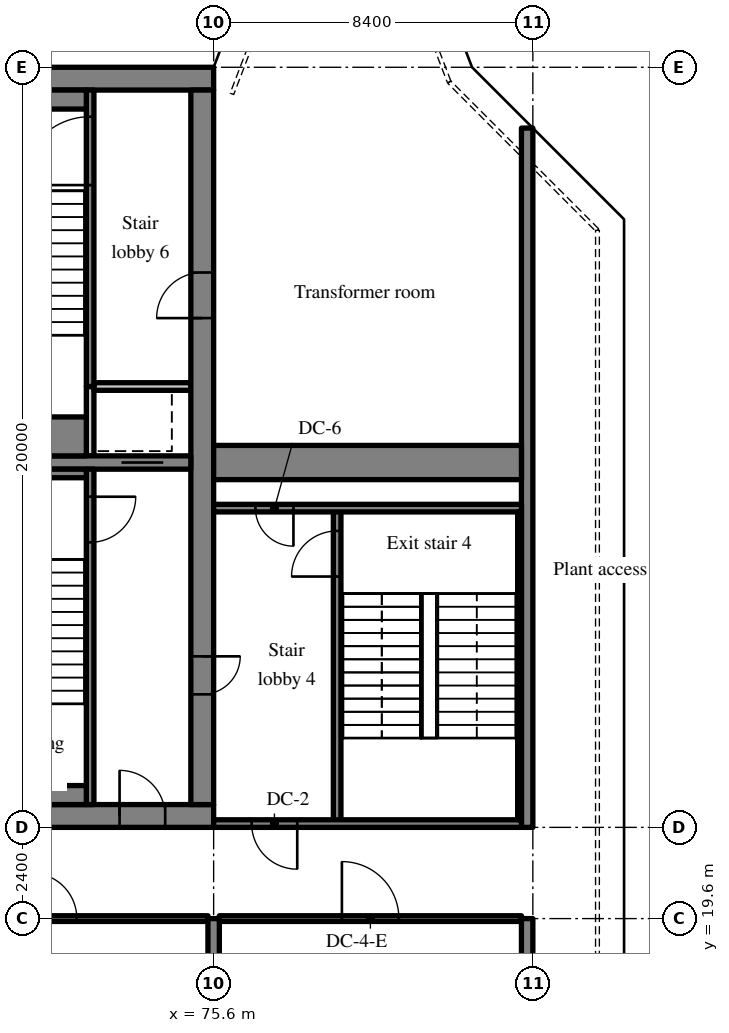
"""IFC4 building model, lengths in metres.
Left out: names, types, materials, properties, quantities, classifications, styles, units other than length and angle.
Written with IfcOpenShell. Run it as: python <this file> out.ifc"""

import sys

from ifc_helpers import new_model, si_unit, direction, frame, frame_2d, origin, place, context, subcontext, project, spatial, rectangle, extrude, source, transform, mapped, element, fill, save


model = new_model("IFC4")
c1 = context("Model", 3, precision=1e-05, world=origin(), true_north=direction((0.0, 1.0)))
c2 = subcontext(c1, "Body", "Model", "MODEL_VIEW")
j1 = project(units=[si_unit("LENGTHUNIT", "METRE"), si_unit("PLANEANGLEUNIT", "RADIAN")], contexts=[c1])
p1 = place(None, origin())
s1 = spatial("IfcSite", under=j1, at=p1, CompositionType="ELEMENT")
p2 = place(p1, origin())
s2 = spatial("IfcBuilding", under=s1, at=p2, CompositionType="ELEMENT")
p3 = place(p2, frame((0.0, 0.0, 264.7)))
s3 = spatial("IfcBuildingStorey", under=s2, at=p3, CompositionType="ELEMENT", Elevation=264.7)
m1 = source(origin(), c2, "Body", "SweptSolid", [
    extrude(rectangle(XDim=50.4, YDim=0.6, at=frame_2d((25.2, 0.0))), origin(), (0.0, 0.0, 1.0), 5.12),
])
p4 = place(p3, frame((25.2, 22.3, 0.0), z_axis=(0.0, 0.0, 1.0), x_axis=(1.0, 0.0, 0.0)))
e1 = element("IfcWall", 1, at=p4, inside=s3, PredefinedType="SHEAR", context=c2, shape_type="MappedRepresentation", body=[
    mapped(m1, transform((0.0, 0.0, 0.0), scale=1.0)),
])
m2 = source(origin(), c2, "Body", "SweptSolid", [
    extrude(rectangle(XDim=1.2, YDim=2.1, at=frame_2d((0.6, 1.05))), frame((0.0, 0.31, 0.0), z_axis=(0.0, -1.0, 0.0), x_axis=(1.0, 0.0, 0.0)), (0.0, 0.0, 1.0), 0.62),
])
p5 = place(p4, frame((22.262, 0.0, 0.0)))
e2 = element("IfcOpeningElement", 2, at=p5, cuts=e1, PredefinedType="OPENING", context=c2, shape_type="MappedRepresentation", body=[
    mapped(m2, transform((0.0, 0.0, 0.0), scale=1.0)),
])
m3 = source(origin(), c2, "Body", "SweptSolid", [
    extrude(rectangle(XDim=0.9, YDim=2.1, at=frame_2d((0.45, 1.05))), frame((0.0, 0.31, 0.0), z_axis=(0.0, -1.0, 0.0), x_axis=(1.0, 0.0, 0.0)), (0.0, 0.0, 1.0), 0.62),
])
p6 = place(p4, frame((17.25, 0.0, 0.0)))
e3 = element("IfcOpeningElement", 3, at=p6, cuts=e1, PredefinedType="OPENING", context=c2, shape_type="MappedRepresentation", body=[
    mapped(m3, transform((0.0, 0.0, 0.0), scale=1.0)),
])
p7 = place(p4, frame((9.656, 0.0, 0.0)))
e4 = element("IfcOpeningElement", 4, at=p7, cuts=e1, PredefinedType="OPENING", context=c2, shape_type="MappedRepresentation", body=[
    mapped(m3, transform((0.0, 0.0, 0.0), scale=1.0)),
])
p8 = place(p4, frame((12.719, 0.0, 0.0)))
e5 = element("IfcOpeningElement", 5, at=p8, cuts=e1, PredefinedType="OPENING", context=c2, shape_type="MappedRepresentation", body=[
    mapped(m3, transform((0.0, 0.0, 0.0), scale=1.0)),
])
m4 = source(origin(), c2, "Body", "SweptSolid", [
    extrude(rectangle(XDim=1.8, YDim=2.1, at=frame_2d((0.9, 1.05))), frame((0.0, 0.31, 0.0), z_axis=(0.0, -1.0, 0.0), x_axis=(1.0, 0.0, 0.0)), (0.0, 0.0, 1.0), 0.62),
])
p9 = place(p4, frame((32.7, 0.0, 0.0)))
e6 = element("IfcOpeningElement", 6, at=p9, cuts=e1, PredefinedType="OPENING", context=c2, shape_type="MappedRepresentation", body=[
    mapped(m4, transform((0.0, 0.0, 0.0), scale=1.0)),
])
p10 = place(p4, frame((6.488, 0.0, 0.0)))
e7 = element("IfcOpeningElement", 7, at=p10, cuts=e1, PredefinedType="OPENING", context=c2, shape_type="MappedRepresentation", body=[
    mapped(m2, transform((0.0, 0.0, 0.0), scale=1.0)),
])
p11 = place(p4, frame((47.925, 0.0, 0.0)))
e8 = element("IfcOpeningElement", 8, at=p11, cuts=e1, PredefinedType="OPENING", context=c2, shape_type="MappedRepresentation", body=[
    mapped(m2, transform((0.0, 0.0, 0.0), scale=1.0)),
])
p12 = place(p3, frame((25.2, 41.7, 0.0), z_axis=(0.0, 0.0, 1.0), x_axis=(1.0, 0.0, 0.0)))
e9 = element("IfcWall", 9, at=p12, inside=s3, PredefinedType="SHEAR", context=c2, shape_type="MappedRepresentation", body=[
    mapped(m1, transform((0.0, 0.0, 0.0), scale=1.0)),
])
m5 = source(origin(), c2, "Body", "SweptSolid", [
    extrude(rectangle(XDim=18.8, YDim=0.6, at=frame_2d((9.4, 0.0))), origin(), (0.0, 0.0, 1.0), 5.12),
])
p13 = place(p3, frame((75.3, 22.6, 0.0), z_axis=(0.0, 0.0, 1.0), x_axis=(0.0, 1.0, 0.0)))
e10 = element("IfcWall", 10, at=p13, inside=s3, PredefinedType="SHEAR", context=c2, shape_type="MappedRepresentation", body=[
    mapped(m5, transform((0.0, 0.0, 0.0), scale=1.0)),
])
m6 = source(origin(), c2, "Body", "SweptSolid", [
    extrude(rectangle(XDim=1.0, YDim=2.1, at=frame_2d((0.5, 1.05))), frame((0.0, 0.31, 0.0), z_axis=(0.0, -1.0, 0.0), x_axis=(1.0, 0.0, 0.0)), (0.0, 0.0, 1.0), 0.62),
])
p14 = place(p13, frame((2.9, 0.0, 0.0)))
e11 = element("IfcOpeningElement", 11, at=p14, cuts=e10, PredefinedType="OPENING", context=c2, shape_type="MappedRepresentation", body=[
    mapped(m6, transform((0.0, 0.0, 0.0), scale=1.0)),
])
p15 = place(p13, frame((12.8, 0.0, 0.0)))
e12 = element("IfcOpeningElement", 12, at=p15, cuts=e10, PredefinedType="OPENING", context=c2, shape_type="MappedRepresentation", body=[
    mapped(m2, transform((0.0, 0.0, 0.0), scale=1.0)),
])
m7 = source(origin(), c2, "Body", "SweptSolid", [
    extrude(rectangle(XDim=7.625, YDim=0.35, at=frame_2d((3.812, 0.0))), origin(), (0.0, 0.0, 1.0), 5.12),
])
p16 = place(p3, frame((67.375, 31.6, 0.0), z_axis=(0.0, 0.0, 1.0), x_axis=(1.0, 0.0, 0.0)))
e13 = element("IfcWall", 13, at=p16, inside=s3, PredefinedType="SHEAR", context=c2, shape_type="MappedRepresentation", body=[
    mapped(m7, transform((0.0, 0.0, 0.0), scale=1.0)),
])
m8 = source(origin(), c2, "Body", "SweptSolid", [
    extrude(rectangle(XDim=1.1, YDim=2.1, at=frame_2d((0.55, 1.05))), frame((0.0, 0.185, 0.0), z_axis=(0.0, -1.0, 0.0), x_axis=(1.0, 0.0, 0.0)), (0.0, 0.0, 1.0), 0.37),
])
p17 = place(p16, frame((5.8, 0.0, 0.0)))
e14 = element("IfcOpeningElement", 14, at=p17, cuts=e13, PredefinedType="OPENING", context=c2, shape_type="MappedRepresentation", body=[
    mapped(m8, transform((0.0, 0.0, 0.0), scale=1.0)),
])
m9 = source(origin(), c2, "Body", "SweptSolid", [
    extrude(rectangle(XDim=14.1, YDim=0.3, at=frame_2d((7.05, 0.0))), origin(), (0.0, 0.0, 1.0), 5.12),
])
p18 = place(p3, frame((75.6, 5.5, 0.0), z_axis=(0.0, 0.0, 1.0), x_axis=(0.0, 1.0, 0.0)))
e15 = element("IfcWall", 15, at=p18, inside=s3, PredefinedType="SHEAR", context=c2, shape_type="MappedRepresentation", body=[
    mapped(m9, transform((0.0, 0.0, 0.0), scale=1.0)),
])
m10 = source(origin(), c2, "Body", "SweptSolid", [
    extrude(rectangle(XDim=12.5, YDim=0.3, at=frame_2d((6.25, 0.0))), origin(), (0.0, 0.0, 1.0), 5.12),
])
p19 = place(p3, frame((83.85, 7.1, 0.0), z_axis=(0.0, 0.0, 1.0), x_axis=(0.0, 1.0, 0.0)))
e16 = element("IfcWall", 16, at=p19, inside=s3, PredefinedType="SHEAR", context=c2, shape_type="MappedRepresentation", body=[
    mapped(m10, transform((0.0, 0.0, 0.0), scale=1.0)),
])
m11 = source(origin(), c2, "Body", "SweptSolid", [
    extrude(rectangle(XDim=18.4, YDim=0.3, at=frame_2d((9.2, 0.0))), origin(), (0.0, 0.0, 1.0), 5.12),
])
p20 = place(p3, frame((83.85, 22.0, 0.0), z_axis=(0.0, 0.0, 1.0), x_axis=(0.0, 1.0, 0.0)))
e17 = element("IfcWall", 17, at=p20, inside=s3, PredefinedType="SHEAR", context=c2, shape_type="MappedRepresentation", body=[
    mapped(m11, transform((0.0, 0.0, 0.0), scale=1.0)),
])
m12 = source(origin(), c2, "Body", "SweptSolid", [
    extrude(rectangle(XDim=8.1, YDim=0.9, at=frame_2d((4.05, 0.0))), origin(), (0.0, 0.0, 1.0), 5.12),
])
p21 = place(p3, frame((75.6, 31.6, 0.0), z_axis=(0.0, 0.0, 1.0), x_axis=(1.0, 0.0, 0.0)))
e18 = element("IfcWall", 18, at=p21, inside=s3, PredefinedType="SHEAR", context=c2, shape_type="MappedRepresentation", body=[
    mapped(m12, transform((0.0, 0.0, 0.0), scale=1.0)),
])
m13 = source(origin(), c2, "Body", "SweptSolid", [
    extrude(rectangle(XDim=8.825, YDim=0.2, at=frame_2d((4.413, 0.0))), origin(), (0.0, 0.0, 1.0), 5.12),
])
p22 = place(p3, frame((72.35, 22.6, 0.0), z_axis=(0.0, 0.0, 1.0), x_axis=(0.0, 1.0, 0.0)))
e19 = element("IfcWall", 19, at=p22, inside=s3, PredefinedType="SOLIDWALL", context=c2, shape_type="MappedRepresentation", body=[
    mapped(m13, transform((0.0, 0.0, 0.0), scale=1.0)),
])
m14 = source(origin(), c2, "Body", "SweptSolid", [
    extrude(rectangle(XDim=1.2, YDim=2.1, at=frame_2d((0.6, 1.05))), frame((0.0, 0.11, 0.0), z_axis=(0.0, -1.0, 0.0), x_axis=(1.0, 0.0, 0.0)), (0.0, 0.0, 1.0), 0.22),
])
p23 = place(p22, frame((6.9, 0.0, 0.0)))
e20 = element("IfcOpeningElement", 20, at=p23, cuts=e19, PredefinedType="OPENING", context=c2, shape_type="MappedRepresentation", body=[
    mapped(m14, transform((0.0, 0.0, 0.0), scale=1.0)),
])
m15 = source(origin(), c2, "Body", "SweptSolid", [
    extrude(rectangle(XDim=1.825, YDim=0.2, at=frame_2d((0.913, 0.0))), origin(), (0.0, 0.0, 1.0), 5.12),
])
p24 = place(p3, frame((72.35, 31.775, 0.0), z_axis=(0.0, 0.0, 1.0), x_axis=(0.0, 1.0, 0.0)))
e21 = element("IfcWall", 21, at=p24, inside=s3, PredefinedType="SOLIDWALL", context=c2, shape_type="MappedRepresentation", body=[
    mapped(m15, transform((0.0, 0.0, 0.0), scale=1.0)),
])
m16 = source(origin(), c2, "Body", "SweptSolid", [
    extrude(rectangle(XDim=2.55, YDim=0.2, at=frame_2d((1.275, 0.0))), origin(), (0.0, 0.0, 1.0), 5.12),
])
p25 = place(p3, frame((72.45, 33.6, 0.0), z_axis=(0.0, 0.0, 1.0), x_axis=(1.0, 0.0, 0.0)))
e22 = element("IfcWall", 22, at=p25, inside=s3, PredefinedType="SOLIDWALL", context=c2, shape_type="MappedRepresentation", body=[
    mapped(m16, transform((0.0, 0.0, 0.0), scale=1.0)),
])
m17 = source(origin(), c2, "Body", "SweptSolid", [
    extrude(rectangle(XDim=7.8, YDim=0.2, at=frame_2d((3.9, 0.0))), origin(), (0.0, 0.0, 1.0), 5.12),
])
p26 = place(p3, frame((72.35, 33.6, 0.0), z_axis=(0.0, 0.0, 1.0), x_axis=(0.0, 1.0, 0.0)))
e23 = element("IfcWall", 23, at=p26, inside=s3, PredefinedType="SOLIDWALL", context=c2, shape_type="MappedRepresentation", body=[
    mapped(m17, transform((0.0, 0.0, 0.0), scale=1.0)),
])
m18 = source(origin(), c2, "Body", "SweptSolid", [
    extrude(rectangle(XDim=1.8, YDim=2.1, at=frame_2d((0.9, 1.05))), frame((0.0, 0.11, 0.0), z_axis=(0.0, -1.0, 0.0), x_axis=(1.0, 0.0, 0.0)), (0.0, 0.0, 1.0), 0.22),
])
p27 = place(p26, frame((5.3, 0.0, 0.0)))
e24 = element("IfcOpeningElement", 24, at=p27, cuts=e23, PredefinedType="OPENING", context=c2, shape_type="MappedRepresentation", body=[
    mapped(m18, transform((0.0, 0.0, 0.0), scale=1.0)),
])
m19 = source(origin(), c2, "Body", "SweptSolid", [
    extrude(rectangle(XDim=8.3, YDim=0.2, at=frame_2d((4.15, 0.0))), origin(), (0.0, 0.0, 1.0), 5.12),
])
p28 = place(p3, frame((78.85, 22.1, 0.0), z_axis=(0.0, 0.0, 1.0), x_axis=(0.0, 1.0, 0.0)))
e25 = element("IfcWall", 25, at=p28, inside=s3, PredefinedType="SOLIDWALL", context=c2, shape_type="MappedRepresentation", body=[
    mapped(m19, transform((0.0, 0.0, 0.0), scale=1.0)),
])
p29 = place(p28, frame((6.5, 0.0, 0.0)))
e26 = element("IfcOpeningElement", 26, at=p29, cuts=e25, PredefinedType="OPENING", context=c2, shape_type="MappedRepresentation", body=[
    mapped(m14, transform((0.0, 0.0, 0.0), scale=1.0)),
])
m20 = source(origin(), c2, "Body", "SweptSolid", [
    extrude(rectangle(XDim=8.1, YDim=0.2, at=frame_2d((4.05, 0.0))), origin(), (0.0, 0.0, 1.0), 5.12),
])
p30 = place(p3, frame((83.7, 22.1, 0.0), z_axis=(0.0, 0.0, 1.0), x_axis=(-1.0, 0.0, 0.0)))
e27 = element("IfcWall", 27, at=p30, inside=s3, PredefinedType="SOLIDWALL", context=c2, shape_type="MappedRepresentation", body=[
    mapped(m20, transform((0.0, 0.0, 0.0), scale=1.0)),
])
p31 = place(p30, frame((5.9, 0.0, 0.0)))
e28 = element("IfcOpeningElement", 28, at=p31, cuts=e27, PredefinedType="OPENING", context=c2, shape_type="MappedRepresentation", body=[
    mapped(m14, transform((0.0, 0.0, 0.0), scale=1.0)),
])
p32 = place(p3, frame((83.7, 30.4, 0.0), z_axis=(0.0, 0.0, 1.0), x_axis=(-1.0, 0.0, 0.0)))
e29 = element("IfcWall", 29, at=p32, inside=s3, PredefinedType="SOLIDWALL", context=c2, shape_type="MappedRepresentation", body=[
    mapped(m20, transform((0.0, 0.0, 0.0), scale=1.0)),
])
m21 = source(origin(), c2, "Body", "SweptSolid", [
    extrude(rectangle(XDim=1.0, YDim=2.1, at=frame_2d((0.5, 1.05))), frame((0.0, 0.11, 0.0), z_axis=(0.0, -1.0, 0.0), x_axis=(1.0, 0.0, 0.0)), (0.0, 0.0, 1.0), 0.22),
])
p33 = place(p32, frame((6.0, 0.0, 0.0)))
e30 = element("IfcOpeningElement", 30, at=p33, cuts=e29, PredefinedType="OPENING", context=c2, shape_type="MappedRepresentation", body=[
    mapped(m21, transform((0.0, 0.0, 0.0), scale=1.0)),
])
m22 = source(origin(), c2, "Body", "SweptSolid", [
    extrude(rectangle(XDim=4.875, YDim=0.5, at=frame_2d((2.438, 0.0))), origin(), (0.0, 0.0, 1.0), 5.12),
])
p34 = place(p3, frame((67.375, 22.85, 0.0), z_axis=(0.0, 0.0, 1.0), x_axis=(1.0, 0.0, 0.0)))
e31 = element("IfcWall", 31, at=p34, inside=s3, PredefinedType="SOLIDWALL", context=c2, shape_type="MappedRepresentation", body=[
    mapped(m22, transform((0.0, 0.0, 0.0), scale=1.0)),
])
m23 = source(origin(), c2, "Body", "SweptSolid", [
    extrude(rectangle(XDim=4.875, YDim=0.225, at=frame_2d((2.438, 0.0))), origin(), (0.0, 0.0, 1.0), 5.12),
])
p35 = place(p3, frame((67.375, 31.312, 0.0), z_axis=(0.0, 0.0, 1.0), x_axis=(1.0, 0.0, 0.0)))
e32 = element("IfcWall", 32, at=p35, inside=s3, PredefinedType="SOLIDWALL", context=c2, shape_type="MappedRepresentation", body=[
    mapped(m23, transform((0.0, 0.0, 0.0), scale=1.0)),
])
p36 = place(p3, frame((67.375, 41.15, 0.0), z_axis=(0.0, 0.0, 1.0), x_axis=(1.0, 0.0, 0.0)))
e33 = element("IfcWall", 33, at=p36, inside=s3, PredefinedType="SOLIDWALL", context=c2, shape_type="MappedRepresentation", body=[
    mapped(m22, transform((0.0, 0.0, 0.0), scale=1.0)),
])
m24 = source(origin(), c2, "Body", "SweptSolid", [
    extrude(rectangle(XDim=4.875, YDim=1.025, at=frame_2d((2.438, 0.0))), origin(), (0.0, 0.0, 1.0), 5.12),
])
p37 = place(p3, frame((67.375, 32.287, 0.0), z_axis=(0.0, 0.0, 1.0), x_axis=(1.0, 0.0, 0.0)))
e34 = element("IfcWall", 34, at=p37, inside=s3, PredefinedType="SOLIDWALL", context=c2, shape_type="MappedRepresentation", body=[
    mapped(m24, transform((0.0, 0.0, 0.0), scale=1.0)),
])
m25 = source(origin(), c2, "Body", "SweptSolid", [
    extrude(rectangle(XDim=8.1, YDim=0.1, at=frame_2d((4.05, 0.0))), origin(), (0.0, 0.0, 1.0), 5.12),
])
p38 = place(p3, frame((83.65, 22.2, 0.0), z_axis=(0.0, 0.0, 1.0), x_axis=(0.0, 1.0, 0.0)))
e35 = element("IfcWall", 35, at=p38, inside=s3, PredefinedType="SOLIDWALL", context=c2, shape_type="MappedRepresentation", body=[
    mapped(m25, transform((0.0, 0.0, 0.0), scale=1.0)),
])
m26 = source(origin(), c2, "Body", "SweptSolid", [
    extrude(rectangle(XDim=8.1, YDim=0.15, at=frame_2d((4.05, 0.0))), origin(), (0.0, 0.0, 1.0), 4.37),
])
p39 = place(p3, frame((67.35, 19.6, 0.0), z_axis=(0.0, 0.0, 1.0), x_axis=(1.0, 0.0, 0.0)))
e36 = element("IfcWall", 36, at=p39, inside=s3, PredefinedType="PARTITIONING", context=c2, shape_type="MappedRepresentation", body=[
    mapped(m26, transform((0.0, 0.0, 0.0), scale=1.0)),
])
m27 = source(origin(), c2, "Body", "SweptSolid", [
    extrude(rectangle(XDim=1.2, YDim=2.1, at=frame_2d((0.6, 1.05))), frame((0.0, 0.085, 0.0), z_axis=(0.0, -1.0, 0.0), x_axis=(1.0, 0.0, 0.0)), (0.0, 0.0, 1.0), 0.17),
])
p40 = place(p39, frame((3.45, 0.0, 0.0)))
e37 = element("IfcOpeningElement", 37, at=p40, cuts=e36, PredefinedType="OPENING", context=c2, shape_type="MappedRepresentation", body=[
    mapped(m27, transform((0.0, 0.0, 0.0), scale=1.0)),
])
m28 = source(origin(), c2, "Body", "SweptSolid", [
    extrude(rectangle(XDim=7.95, YDim=0.15, at=frame_2d((3.975, 0.0))), origin(), (0.0, 0.0, 1.0), 4.37),
])
p41 = place(p3, frame((75.75, 19.6, 0.0), z_axis=(0.0, 0.0, 1.0), x_axis=(1.0, 0.0, 0.0)))
e38 = element("IfcWall", 38, at=p41, inside=s3, PredefinedType="PARTITIONING", context=c2, shape_type="MappedRepresentation", body=[
    mapped(m28, transform((0.0, 0.0, 0.0), scale=1.0)),
])
m29 = source(origin(), c2, "Body", "SweptSolid", [
    extrude(rectangle(XDim=1.5, YDim=2.1, at=frame_2d((0.75, 1.05))), frame((0.0, 0.085, 0.0), z_axis=(0.0, -1.0, 0.0), x_axis=(1.0, 0.0, 0.0)), (0.0, 0.0, 1.0), 0.17),
])
p42 = place(p41, frame((3.225, 0.0, 0.0)))
e39 = element("IfcOpeningElement", 39, at=p42, cuts=e38, PredefinedType="OPENING", context=c2, shape_type="MappedRepresentation", body=[
    mapped(m29, transform((0.0, 0.0, 0.0), scale=1.0)),
])
m30 = source(origin(), c2, "Body", "SweptSolid", [
    extrude(rectangle(XDim=1.2, YDim=2.1, at=frame_2d((0.6, 1.05))), frame((0.0, 0.025, 0.0), z_axis=(0.0, -1.0, 0.0), x_axis=(1.0, 0.0, 0.0)), (0.0, 0.0, 1.0), 0.05),
])
p43 = place(p23, origin())
e40 = element("IfcDoor", 40, at=p43, inside=s3, OperationType="SINGLE_SWING_RIGHT", PredefinedType="DOOR", context=c2, shape_type="MappedRepresentation", body=[
    mapped(m30, transform((0.0, 0.0, 0.0), scale=1.0)),
])
fill(e20, e40)
m31 = source(origin(), c2, "Body", "SweptSolid", [
    extrude(rectangle(XDim=1.2, YDim=2.1, at=frame_2d((0.6, 1.05))), frame((0.0, 0.225, 0.0), z_axis=(0.0, -1.0, 0.0), x_axis=(1.0, 0.0, 0.0)), (0.0, 0.0, 1.0), 0.05),
])
p44 = place(p11, origin())
e41 = element("IfcDoor", 41, at=p44, inside=s3, OperationType="SINGLE_SWING_LEFT", PredefinedType="DOOR", context=c2, shape_type="MappedRepresentation", body=[
    mapped(m31, transform((0.0, 0.0, 0.0), scale=1.0)),
])
fill(e8, e41)
m32 = source(origin(), c2, "Body", "SweptSolid", [
    extrude(rectangle(XDim=1.1, YDim=2.1, at=frame_2d((0.55, 1.05))), frame((0.0, 0.025, 0.0), z_axis=(0.0, -1.0, 0.0), x_axis=(1.0, 0.0, 0.0)), (0.0, 0.0, 1.0), 0.05),
])
p45 = place(p17, origin())
e42 = element("IfcDoor", 42, at=p45, inside=s3, OperationType="SLIDING_TO_LEFT", PredefinedType="DOOR", context=c2, shape_type="MappedRepresentation", body=[
    mapped(m32, transform((0.0, 0.0, 0.0), scale=1.0)),
])
fill(e14, e42)
m33 = source(origin(), c2, "Body", "SweptSolid", [
    extrude(rectangle(XDim=1.0, YDim=2.1, at=frame_2d((0.5, 1.05))), frame((0.0, 0.025, 0.0), z_axis=(0.0, -1.0, 0.0), x_axis=(1.0, 0.0, 0.0)), (0.0, 0.0, 1.0), 0.05),
])
p46 = place(p14, origin())
e43 = element("IfcDoor", 43, at=p46, inside=s3, OperationType="SINGLE_SWING_RIGHT", PredefinedType="DOOR", context=c2, shape_type="MappedRepresentation", body=[
    mapped(m33, transform((0.0, 0.0, 0.0), scale=1.0)),
])
fill(e11, e43)
m34 = source(origin(), c2, "Body", "SweptSolid", [
    extrude(rectangle(XDim=1.8, YDim=2.1, at=frame_2d((0.9, 1.05))), frame((0.0, 0.025, 0.0), z_axis=(0.0, -1.0, 0.0), x_axis=(1.0, 0.0, 0.0)), (0.0, 0.0, 1.0), 0.05),
])
p47 = place(p27, origin())
e44 = element("IfcDoor", 44, at=p47, inside=s3, OperationType="SINGLE_SWING_LEFT", PredefinedType="DOOR", context=c2, shape_type="MappedRepresentation", body=[
    mapped(m34, transform((0.0, 0.0, 0.0), scale=1.0)),
])
fill(e24, e44)
p48 = place(p29, origin())
e45 = element("IfcDoor", 45, at=p48, inside=s3, OperationType="SINGLE_SWING_LEFT", PredefinedType="DOOR", context=c2, shape_type="MappedRepresentation", body=[
    mapped(m30, transform((0.0, 0.0, 0.0), scale=1.0)),
])
fill(e26, e45)
p49 = place(p31, origin())
e46 = element("IfcDoor", 46, at=p49, inside=s3, OperationType="SINGLE_SWING_LEFT", PredefinedType="DOOR", context=c2, shape_type="MappedRepresentation", body=[
    mapped(m30, transform((0.0, 0.0, 0.0), scale=1.0)),
])
fill(e28, e46)
p50 = place(p33, origin())
e47 = element("IfcDoor", 47, at=p50, inside=s3, OperationType="SINGLE_SWING_LEFT", PredefinedType="DOOR", context=c2, shape_type="MappedRepresentation", body=[
    mapped(m33, transform((0.0, 0.0, 0.0), scale=1.0)),
])
fill(e30, e47)
p51 = place(p40, origin())
e48 = element("IfcDoor", 48, at=p51, inside=s3, OperationType="SINGLE_SWING_LEFT", PredefinedType="DOOR", context=c2, shape_type="MappedRepresentation", body=[
    mapped(m30, transform((0.0, 0.0, 0.0), scale=1.0)),
])
fill(e37, e48)
m35 = source(origin(), c2, "Body", "SweptSolid", [
    extrude(rectangle(XDim=1.5, YDim=2.1, at=frame_2d((0.75, 1.05))), frame((0.0, 0.025, 0.0), z_axis=(0.0, -1.0, 0.0), x_axis=(1.0, 0.0, 0.0)), (0.0, 0.0, 1.0), 0.05),
])
p52 = place(p42, origin())
e49 = element("IfcDoor", 49, at=p52, inside=s3, OperationType="SINGLE_SWING_LEFT", PredefinedType="DOOR", context=c2, shape_type="MappedRepresentation", body=[
    mapped(m35, transform((0.0, 0.0, 0.0), scale=1.0)),
])
fill(e39, e49)
p53 = place(p15, origin())
e50 = element("IfcDoor", 50, at=p53, inside=s3, OperationType="SINGLE_SWING_LEFT", PredefinedType="DOOR", context=c2, shape_type="MappedRepresentation", body=[
    mapped(m30, transform((0.0, 0.0, 0.0), scale=1.0)),
])
fill(e12, e50)
save(model, sys.argv[1])
